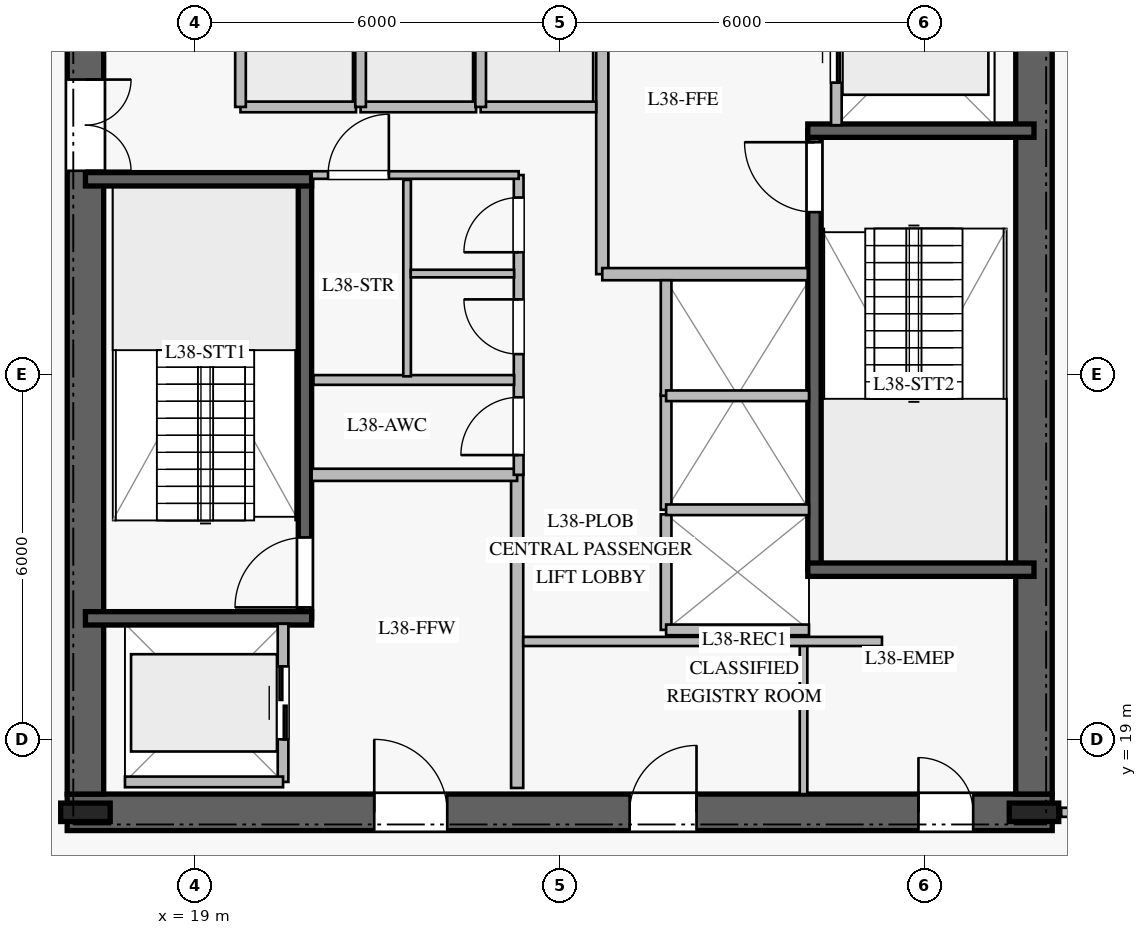
"""IFC4 building model, lengths in metres.
Left out: names, types, materials, properties, quantities, classifications, styles, units other than length and angle.
Written with IfcOpenShell. Run it as: python <this file> out.ifc"""

import sys

from ifc_helpers import new_model, si_unit, direction, frame, frame_2d, origin, origin_2d, place, context, subcontext, project, spatial, rectangle, i_section, extrude, element, fill, save


model = new_model("IFC4")
c1 = context("Model", 3, precision=1e-05, world=origin(), true_north=direction((0.0, 1.0)))
c2 = subcontext(c1, "Body", "Model", "MODEL_VIEW")
j1 = project(units=[si_unit("LENGTHUNIT", "METRE"), si_unit("PLANEANGLEUNIT", "RADIAN")], contexts=[c1])
p1 = place(None, origin())
s1 = spatial("IfcSite", under=j1, at=p1, CompositionType="ELEMENT")
p2 = place(p1, origin())
s2 = spatial("IfcBuilding", under=s1, at=p2, CompositionType="ELEMENT")
p3 = place(p2, frame((0.0, 0.0, 158.4)))
s3 = spatial("IfcBuildingStorey", under=s2, at=p3, CompositionType="ELEMENT", Elevation=158.4)
p4 = place(p3, frame((16.9, 17.8, 0.0), z_axis=(0.0, 0.0, 1.0), x_axis=(1.0, 0.0, 0.0)))
e1 = element("IfcWall", 1, at=p4, inside=s3, PredefinedType="SHEAR", context=c2, shape_type="SweptSolid", body=[
    extrude(rectangle(XDim=16.2, YDim=0.6, at=frame_2d((8.1, 0.0))), origin(), (0.0, 0.0, 1.0), 3.76),
])
p5 = place(p4, frame((5.05, 0.0, 0.0)))
e2 = element("IfcOpeningElement", 2, at=p5, cuts=e1, PredefinedType="OPENING", context=c2, shape_type="SweptSolid", body=[
    extrude(rectangle(XDim=1.2, YDim=2.25, at=frame_2d((0.6, 1.125))), frame((0.0, 0.31, 0.0), z_axis=(0.0, -1.0, 0.0), x_axis=(1.0, 0.0, 0.0)), (0.0, 0.0, 1.0), 0.62),
])
p6 = place(p4, frame((14.0, 0.0, 0.0)))
e3 = element("IfcOpeningElement", 3, at=p6, cuts=e1, PredefinedType="OPENING", context=c2, shape_type="SweptSolid", body=[
    extrude(rectangle(XDim=0.9, YDim=2.1, at=frame_2d((0.45, 1.05))), frame((0.0, 0.31, 0.0), z_axis=(0.0, -1.0, 0.0), x_axis=(1.0, 0.0, 0.0)), (0.0, 0.0, 1.0), 0.62),
])
p7 = place(p4, frame((9.25, 0.0, 0.0)))
e4 = element("IfcOpeningElement", 4, at=p7, cuts=e1, PredefinedType="OPENING", context=c2, shape_type="SweptSolid", body=[
    extrude(rectangle(XDim=1.1, YDim=2.2, at=frame_2d((0.55, 1.1))), frame((0.0, 0.31, 0.0), z_axis=(0.0, -1.0, 0.0), x_axis=(1.0, 0.0, 0.0)), (0.0, 0.0, 1.0), 0.62),
])
p8 = place(p3, frame((17.2, 31.9, 0.0), z_axis=(0.0, 0.0, 1.0), x_axis=(0.0, -1.0, 0.0)))
e5 = element("IfcWall", 5, at=p8, inside=s3, PredefinedType="SHEAR", context=c2, shape_type="SweptSolid", body=[
    extrude(rectangle(XDim=13.8, YDim=0.6, at=frame_2d((6.9, 0.0))), origin(), (0.0, 0.0, 1.0), 3.76),
])
p9 = place(p8, frame((2.05, 0.0, 0.0)))
e6 = element("IfcOpeningElement", 6, at=p9, cuts=e5, PredefinedType="OPENING", context=c2, shape_type="SweptSolid", body=[
    extrude(rectangle(XDim=1.5, YDim=2.2, at=frame_2d((0.75, 1.1))), frame((0.0, 0.31, 0.0), z_axis=(0.0, -1.0, 0.0), x_axis=(1.0, 0.0, 0.0)), (0.0, 0.0, 1.0), 0.62),
])
p10 = place(p3, frame((32.8, 18.1, 0.0), z_axis=(0.0, 0.0, 1.0), x_axis=(0.0, 1.0, 0.0)))
e7 = element("IfcWall", 7, at=p10, inside=s3, PredefinedType="SHEAR", context=c2, shape_type="SweptSolid", body=[
    extrude(rectangle(XDim=13.8, YDim=0.6, at=frame_2d((6.9, 0.0))), origin(), (0.0, 0.0, 1.0), 3.76),
])
for number, where, z_axis, x_axis in (
    (8, (17.2, 17.8, 0.0), (0.0, 0.0, 1.0), (1.0, 0.0, 0.0)),
    (9, (32.8, 17.8, 0.0), (0.0, 0.0, 1.0), (1.0, 0.0, 0.0)),
):
    element("IfcColumn", number, at=place(p3, frame(where, z_axis=z_axis, x_axis=x_axis)), inside=s3, PredefinedType="COLUMN", context=c2, shape_type="SweptSolid", body=[
        extrude(i_section(OverallWidth=0.303, OverallDepth=0.814, WebThickness=0.021, FlangeThickness=0.04, at=origin_2d()), origin(), (0.0, 0.0, 1.0), 4.0),
    ])
p11 = place(p3, frame((20.81, 20.99, 0.0), z_axis=(0.0, 0.0, 1.0), x_axis=(0.0, 1.0, 0.0)))
e10 = element("IfcWall", 10, at=p11, inside=s3, PredefinedType="SOLIDWALL", context=c2, shape_type="SweptSolid", body=[
    extrude(rectangle(XDim=7.22, YDim=0.22, at=frame_2d((3.61, 0.0))), origin(), (0.0, 0.0, 1.0), 3.76),
])
p12 = place(p11, frame((0.18, 0.0, 0.0)))
e11 = element("IfcOpeningElement", 11, at=p12, cuts=e10, PredefinedType="OPENING", context=c2, shape_type="SweptSolid", body=[
    extrude(rectangle(XDim=1.15, YDim=2.2, at=frame_2d((0.575, 1.1))), frame((0.0, 0.12, 0.0), z_axis=(0.0, -1.0, 0.0), x_axis=(1.0, 0.0, 0.0)), (0.0, 0.0, 1.0), 0.24),
])
for number, where, z_axis, x_axis in (
    (12, (17.2, 20.99, 0.0), (0.0, 0.0, 1.0), (1.0, 0.0, 0.0)),
    (13, (17.2, 28.21, 0.0), (0.0, 0.0, 1.0), (1.0, 0.0, 0.0)),
):
    element("IfcWall", number, at=place(p3, frame(where, z_axis=z_axis, x_axis=x_axis)), inside=s3, PredefinedType="SOLIDWALL", context=c2, shape_type="SweptSolid", body=[
        extrude(rectangle(XDim=3.72, YDim=0.22, at=frame_2d((1.86, 0.0))), origin(), (0.0, 0.0, 1.0), 3.76),
    ])
p13 = place(p3, frame((29.19, 21.79, 0.0), z_axis=(0.0, 0.0, 1.0), x_axis=(0.0, 1.0, 0.0)))
e14 = element("IfcWall", 14, at=p13, inside=s3, PredefinedType="SOLIDWALL", context=c2, shape_type="SweptSolid", body=[
    extrude(rectangle(XDim=7.22, YDim=0.22, at=frame_2d((3.61, 0.0))), origin(), (0.0, 0.0, 1.0), 3.76),
])
p14 = place(p13, frame((5.88, 0.0, 0.0)))
e15 = element("IfcOpeningElement", 15, at=p14, cuts=e14, PredefinedType="OPENING", context=c2, shape_type="SweptSolid", body=[
    extrude(rectangle(XDim=1.15, YDim=2.2, at=frame_2d((0.575, 1.1))), frame((0.0, 0.12, 0.0), z_axis=(0.0, -1.0, 0.0), x_axis=(1.0, 0.0, 0.0)), (0.0, 0.0, 1.0), 0.24),
])
for number, where, z_axis, x_axis in (
    (16, (29.08, 21.79, 0.0), (0.0, 0.0, 1.0), (1.0, 0.0, 0.0)),
    (17, (29.08, 29.01, 0.0), (0.0, 0.0, 1.0), (1.0, 0.0, 0.0)),
):
    element("IfcWall", number, at=place(p3, frame(where, z_axis=z_axis, x_axis=x_axis)), inside=s3, PredefinedType="SOLIDWALL", context=c2, shape_type="SweptSolid", body=[
        extrude(rectangle(XDim=3.72, YDim=0.22, at=frame_2d((1.86, 0.0))), origin(), (0.0, 0.0, 1.0), 3.76),
    ])
p15 = place(p3, frame((24.3, 18.2, 0.0), z_axis=(0.0, 0.0, 1.0), x_axis=(0.0, 1.0, 0.0)))
e18 = element("IfcWall", 18, at=p15, inside=s3, PredefinedType="PARTITIONING", context=c2, shape_type="SweptSolid", body=[
    extrude(rectangle(XDim=5.15, YDim=0.2, at=frame_2d((2.575, 0.0))), origin(), (0.0, 0.0, 1.0), 3.76),
])
p16 = place(p3, frame((20.92, 23.35, 0.0), z_axis=(0.0, 0.0, 1.0), x_axis=(1.0, 0.0, 0.0)))
e19 = element("IfcWall", 19, at=p16, inside=s3, PredefinedType="PARTITIONING", context=c2, shape_type="SweptSolid", body=[
    extrude(rectangle(XDim=3.38, YDim=0.2, at=frame_2d((1.69, 0.0))), origin(), (0.0, 0.0, 1.0), 3.76),
])
p17 = place(p3, frame((25.7, 26.65, 0.0), z_axis=(0.0, 0.0, 1.0), x_axis=(0.0, 1.0, 0.0)))
e20 = element("IfcWall", 20, at=p17, inside=s3, PredefinedType="PARTITIONING", context=c2, shape_type="SweptSolid", body=[
    extrude(rectangle(XDim=5.15, YDim=0.2, at=frame_2d((2.575, 0.0))), origin(), (0.0, 0.0, 1.0), 3.76),
])
p18 = place(p3, frame((25.7, 26.65, 0.0), z_axis=(0.0, 0.0, 1.0), x_axis=(1.0, 0.0, 0.0)))
e21 = element("IfcWall", 21, at=p18, inside=s3, PredefinedType="PARTITIONING", context=c2, shape_type="SweptSolid", body=[
    extrude(rectangle(XDim=3.38, YDim=0.2, at=frame_2d((1.69, 0.0))), origin(), (0.0, 0.0, 1.0), 3.76),
])
p19 = place(p3, frame((24.325, 23.35, 0.0), z_axis=(0.0, 0.0, 1.0), x_axis=(0.0, 1.0, 0.0)))
e22 = element("IfcWall", 22, at=p19, inside=s3, PredefinedType="PLUMBINGWALL", context=c2, shape_type="SweptSolid", body=[
    extrude(rectangle(XDim=4.93, YDim=0.16, at=frame_2d((2.465, 0.0))), origin(), (0.0, 0.0, 1.0), 3.76),
])
p20 = place(p19, frame((0.325, 0.0, 0.0)))
e23 = element("IfcOpeningElement", 23, at=p20, cuts=e22, PredefinedType="OPENING", context=c2, shape_type="SweptSolid", body=[
    extrude(rectangle(XDim=0.95, YDim=2.1, at=frame_2d((0.475, 1.05))), frame((0.0, 0.09, 0.0), z_axis=(0.0, -1.0, 0.0), x_axis=(1.0, 0.0, 0.0)), (0.0, 0.0, 1.0), 0.18),
])
p21 = place(p19, frame((1.985, 0.0, 0.0)))
e24 = element("IfcOpeningElement", 24, at=p21, cuts=e22, PredefinedType="OPENING", context=c2, shape_type="SweptSolid", body=[
    extrude(rectangle(XDim=0.9, YDim=2.1, at=frame_2d((0.45, 1.05))), frame((0.0, 0.09, 0.0), z_axis=(0.0, -1.0, 0.0), x_axis=(1.0, 0.0, 0.0)), (0.0, 0.0, 1.0), 0.18),
])
p22 = place(p19, frame((3.66, 0.0, 0.0)))
e25 = element("IfcOpeningElement", 25, at=p22, cuts=e22, PredefinedType="OPENING", context=c2, shape_type="SweptSolid", body=[
    extrude(rectangle(XDim=0.9, YDim=2.1, at=frame_2d((0.45, 1.05))), frame((0.0, 0.09, 0.0), z_axis=(0.0, -1.0, 0.0), x_axis=(1.0, 0.0, 0.0)), (0.0, 0.0, 1.0), 0.18),
])
p23 = place(p3, frame((20.92, 28.28, 0.0), z_axis=(0.0, 0.0, 1.0), x_axis=(1.0, 0.0, 0.0)))
e26 = element("IfcWall", 26, at=p23, inside=s3, PredefinedType="PARTITIONING", context=c2, shape_type="SweptSolid", body=[
    extrude(rectangle(XDim=3.405, YDim=0.125, at=frame_2d((1.703, 0.0))), origin(), (0.0, 0.0, 1.0), 3.76),
])
p24 = place(p23, frame((0.27, 0.0, 0.0)))
e27 = element("IfcOpeningElement", 27, at=p24, cuts=e26, PredefinedType="OPENING", context=c2, shape_type="SweptSolid", body=[
    extrude(rectangle(XDim=1.0, YDim=2.15, at=frame_2d((0.5, 1.075))), frame((0.0, 0.073, 0.0), z_axis=(0.0, -1.0, 0.0), x_axis=(1.0, 0.0, 0.0)), (0.0, 0.0, 1.0), 0.145),
])
p25 = place(p3, frame((29.01, 18.1, 0.0), z_axis=(0.0, 0.0, 1.0), x_axis=(0.0, 1.0, 0.0)))
e28 = element("IfcWall", 28, at=p25, inside=s3, PredefinedType="PARTITIONING", context=c2, shape_type="SweptSolid", body=[
    extrude(rectangle(XDim=2.45, YDim=0.125, at=frame_2d((1.225, 0.0))), origin(), (0.0, 0.0, 1.0), 3.06),
])
p26 = place(p3, frame((20.95, 24.91, 0.0), z_axis=(0.0, 0.0, 1.0), x_axis=(1.0, 0.0, 0.0)))
e29 = element("IfcWall", 29, at=p26, inside=s3, PredefinedType="PLUMBINGWALL", context=c2, shape_type="SweptSolid", body=[
    extrude(rectangle(XDim=3.3, YDim=0.16, at=frame_2d((1.65, 0.0))), origin(), (0.0, 0.0, 1.0), 3.76),
])
p27 = place(p3, frame((22.49, 24.97, 0.0), z_axis=(0.0, 0.0, 1.0), x_axis=(0.0, 1.0, 0.0)))
e30 = element("IfcWall", 30, at=p27, inside=s3, PredefinedType="PARTITIONING", context=c2, shape_type="SweptSolid", body=[
    extrude(rectangle(XDim=3.23, YDim=0.125, at=frame_2d((1.615, 0.0))), origin(), (0.0, 0.0, 1.0), 3.76),
])
p28 = place(p3, frame((22.55, 26.66, 0.0), z_axis=(0.0, 0.0, 1.0), x_axis=(1.0, 0.0, 0.0)))
e31 = element("IfcWall", 31, at=p28, inside=s3, PredefinedType="PARTITIONING", context=c2, shape_type="SweptSolid", body=[
    extrude(rectangle(XDim=1.7, YDim=0.125, at=frame_2d((0.85, 0.0))), origin(), (0.0, 0.0, 1.0), 3.76),
])
p29 = place(p3, frame((24.4, 20.61, 0.0), z_axis=(0.0, 0.0, 1.0), x_axis=(1.0, 0.0, 0.0)))
e32 = element("IfcWall", 32, at=p29, inside=s3, PredefinedType="PARTITIONING", context=c2, shape_type="SweptSolid", body=[
    extrude(rectangle(XDim=5.9, YDim=0.15, at=frame_2d((2.95, 0.0))), origin(), (0.0, 0.0, 1.0), 3.76),
])
p30 = place(p3, frame((19.75, 29.4, 0.0), z_axis=(0.0, 0.0, 1.0), x_axis=(1.0, 0.0, 0.0)))
e33 = element("IfcWall", 33, at=p30, inside=s3, PredefinedType="PARTITIONING", context=c2, shape_type="SweptSolid", body=[
    extrude(rectangle(XDim=1.9, YDim=0.175, at=frame_2d((0.95, 0.0))), origin(), (0.0, 0.0, 1.0), 3.76),
])
p31 = place(p3, frame((19.75, 29.4, 0.0), z_axis=(0.0, 0.0, 1.0), x_axis=(0.0, 1.0, 0.0)))
e34 = element("IfcWall", 34, at=p31, inside=s3, PredefinedType="PARTITIONING", context=c2, shape_type="SweptSolid", body=[
    extrude(rectangle(XDim=2.35, YDim=0.175, at=frame_2d((1.175, 0.0))), origin(), (0.0, 0.0, 1.0), 3.76),
])
p32 = place(p3, frame((21.725, 29.4, 0.0), z_axis=(0.0, 0.0, 1.0), x_axis=(1.0, 0.0, 0.0)))
e35 = element("IfcWall", 35, at=p32, inside=s3, PredefinedType="PARTITIONING", context=c2, shape_type="SweptSolid", body=[
    extrude(rectangle(XDim=1.9, YDim=0.175, at=frame_2d((0.95, 0.0))), origin(), (0.0, 0.0, 1.0), 3.76),
])
p33 = place(p3, frame((21.725, 29.4, 0.0), z_axis=(0.0, 0.0, 1.0), x_axis=(0.0, 1.0, 0.0)))
e36 = element("IfcWall", 36, at=p33, inside=s3, PredefinedType="PARTITIONING", context=c2, shape_type="SweptSolid", body=[
    extrude(rectangle(XDim=2.35, YDim=0.175, at=frame_2d((1.175, 0.0))), origin(), (0.0, 0.0, 1.0), 3.76),
])
p34 = place(p3, frame((23.7, 29.4, 0.0), z_axis=(0.0, 0.0, 1.0), x_axis=(1.0, 0.0, 0.0)))
e37 = element("IfcWall", 37, at=p34, inside=s3, PredefinedType="PARTITIONING", context=c2, shape_type="SweptSolid", body=[
    extrude(rectangle(XDim=1.9, YDim=0.175, at=frame_2d((0.95, 0.0))), origin(), (0.0, 0.0, 1.0), 3.76),
])
p35 = place(p3, frame((23.7, 29.4, 0.0), z_axis=(0.0, 0.0, 1.0), x_axis=(0.0, 1.0, 0.0)))
e38 = element("IfcWall", 38, at=p35, inside=s3, PredefinedType="PARTITIONING", context=c2, shape_type="SweptSolid", body=[
    extrude(rectangle(XDim=2.35, YDim=0.175, at=frame_2d((1.175, 0.0))), origin(), (0.0, 0.0, 1.0), 3.76),
])
p36 = place(p3, frame((26.75, 20.8, 0.0), z_axis=(0.0, 0.0, 1.0), x_axis=(0.0, 1.0, 0.0)))
e39 = element("IfcWall", 39, at=p36, inside=s3, PredefinedType="PARTITIONING", context=c2, shape_type="SweptSolid", body=[
    extrude(rectangle(XDim=1.9, YDim=0.175, at=frame_2d((0.95, 0.0))), origin(), (0.0, 0.0, 1.0), 3.76),
])
p37 = place(p3, frame((26.75, 20.8, 0.0), z_axis=(0.0, 0.0, 1.0), x_axis=(1.0, 0.0, 0.0)))
e40 = element("IfcWall", 40, at=p37, inside=s3, PredefinedType="PARTITIONING", context=c2, shape_type="SweptSolid", body=[
    extrude(rectangle(XDim=2.35, YDim=0.175, at=frame_2d((1.175, 0.0))), origin(), (0.0, 0.0, 1.0), 3.76),
])
p38 = place(p3, frame((26.75, 22.775, 0.0), z_axis=(0.0, 0.0, 1.0), x_axis=(0.0, 1.0, 0.0)))
e41 = element("IfcWall", 41, at=p38, inside=s3, PredefinedType="PARTITIONING", context=c2, shape_type="SweptSolid", body=[
    extrude(rectangle(XDim=1.9, YDim=0.175, at=frame_2d((0.95, 0.0))), origin(), (0.0, 0.0, 1.0), 3.76),
])
p39 = place(p3, frame((26.75, 22.775, 0.0), z_axis=(0.0, 0.0, 1.0), x_axis=(1.0, 0.0, 0.0)))
e42 = element("IfcWall", 42, at=p39, inside=s3, PredefinedType="PARTITIONING", context=c2, shape_type="SweptSolid", body=[
    extrude(rectangle(XDim=2.35, YDim=0.175, at=frame_2d((1.175, 0.0))), origin(), (0.0, 0.0, 1.0), 3.76),
])
p40 = place(p3, frame((26.75, 24.65, 0.0), z_axis=(0.0, 0.0, 1.0), x_axis=(0.0, 1.0, 0.0)))
e43 = element("IfcWall", 43, at=p40, inside=s3, PredefinedType="PARTITIONING", context=c2, shape_type="SweptSolid", body=[
    extrude(rectangle(XDim=1.9, YDim=0.175, at=frame_2d((0.95, 0.0))), origin(), (0.0, 0.0, 1.0), 3.76),
])
p41 = place(p3, frame((26.75, 24.65, 0.0), z_axis=(0.0, 0.0, 1.0), x_axis=(1.0, 0.0, 0.0)))
e44 = element("IfcWall", 44, at=p41, inside=s3, PredefinedType="PARTITIONING", context=c2, shape_type="SweptSolid", body=[
    extrude(rectangle(XDim=2.35, YDim=0.175, at=frame_2d((1.175, 0.0))), origin(), (0.0, 0.0, 1.0), 3.76),
])
p42 = place(p3, frame((20.45, 18.3, 0.0), z_axis=(0.0, 0.0, 1.0), x_axis=(0.0, 1.0, 0.0)))
e45 = element("IfcWall", 45, at=p42, inside=s3, PredefinedType="PARTITIONING", context=c2, shape_type="SweptSolid", body=[
    extrude(rectangle(XDim=2.6, YDim=0.175, at=frame_2d((1.3, 0.0))), origin(), (0.0, 0.0, 1.0), 3.76),
])
p43 = place(p42, frame((0.7, 0.0, 0.0)))
e46 = element("IfcOpeningElement", 46, at=p43, cuts=e45, PredefinedType="OPENING", context=c2, shape_type="SweptSolid", body=[
    extrude(rectangle(XDim=1.2, YDim=2.2, at=frame_2d((0.6, 1.1))), frame((0.0, 0.098, 0.0), z_axis=(0.0, -1.0, 0.0), x_axis=(1.0, 0.0, 0.0)), (0.0, 0.0, 1.0), 0.195),
])
p44 = place(p3, frame((17.85, 18.3, 0.0), z_axis=(0.0, 0.0, 1.0), x_axis=(1.0, 0.0, 0.0)))
e47 = element("IfcWall", 47, at=p44, inside=s3, PredefinedType="PARTITIONING", context=c2, shape_type="SweptSolid", body=[
    extrude(rectangle(XDim=2.6, YDim=0.175, at=frame_2d((1.3, 0.0))), origin(), (0.0, 0.0, 1.0), 3.76),
])
p45 = place(p3, frame((29.55, 29.1, 0.0), z_axis=(0.0, 0.0, 1.0), x_axis=(0.0, 1.0, 0.0)))
e48 = element("IfcWall", 48, at=p45, inside=s3, PredefinedType="PARTITIONING", context=c2, shape_type="SweptSolid", body=[
    extrude(rectangle(XDim=2.6, YDim=0.175, at=frame_2d((1.3, 0.0))), origin(), (0.0, 0.0, 1.0), 3.76),
])
p46 = place(p45, frame((0.7, 0.0, 0.0)))
e49 = element("IfcOpeningElement", 49, at=p46, cuts=e48, PredefinedType="OPENING", context=c2, shape_type="SweptSolid", body=[
    extrude(rectangle(XDim=1.2, YDim=2.2, at=frame_2d((0.6, 1.1))), frame((0.0, 0.098, 0.0), z_axis=(0.0, -1.0, 0.0), x_axis=(1.0, 0.0, 0.0)), (0.0, 0.0, 1.0), 0.195),
])
p47 = place(p3, frame((33.247, 17.8, 0.0), z_axis=(0.0, 0.0, 1.0), x_axis=(1.0, 0.0, 0.0)))
e50 = element("IfcWall", 50, at=p47, inside=s3, PredefinedType="PARTITIONING", context=c2, shape_type="SweptSolid", body=[
    extrude(rectangle(XDim=7.953, YDim=0.15, at=frame_2d((3.977, 0.0))), origin(), (0.0, 0.0, 1.0), 3.05),
])
p48 = place(p12, origin())
e51 = element("IfcDoor", 51, at=p48, inside=s3, OperationType="SINGLE_SWING_LEFT", PredefinedType="DOOR", context=c2, shape_type="SweptSolid", body=[
    extrude(rectangle(XDim=1.15, YDim=2.2, at=frame_2d((0.575, 1.1))), frame((0.0, 0.025, 0.0), z_axis=(0.0, -1.0, 0.0), x_axis=(1.0, 0.0, 0.0)), (0.0, 0.0, 1.0), 0.05),
])
fill(e11, e51)
p49 = place(p14, origin())
e52 = element("IfcDoor", 52, at=p49, inside=s3, OperationType="SINGLE_SWING_RIGHT", PredefinedType="DOOR", context=c2, shape_type="SweptSolid", body=[
    extrude(rectangle(XDim=1.15, YDim=2.2, at=frame_2d((0.575, 1.1))), frame((0.0, 0.025, 0.0), z_axis=(0.0, -1.0, 0.0), x_axis=(1.0, 0.0, 0.0)), (0.0, 0.0, 1.0), 0.05),
])
fill(e15, e52)
p50 = place(p5, origin())
e53 = element("IfcDoor", 53, at=p50, inside=s3, OperationType="SINGLE_SWING_LEFT", PredefinedType="DOOR", context=c2, shape_type="SweptSolid", body=[
    extrude(rectangle(XDim=1.2, YDim=2.25, at=frame_2d((0.6, 1.125))), frame((0.0, 0.025, 0.0), z_axis=(0.0, -1.0, 0.0), x_axis=(1.0, 0.0, 0.0)), (0.0, 0.0, 1.0), 0.05),
])
fill(e2, e53)
p51 = place(p9, origin())
e54 = element("IfcDoor", 54, at=p51, inside=s3, OperationType="DOUBLE_DOOR_SINGLE_SWING", PredefinedType="DOOR", context=c2, shape_type="SweptSolid", body=[
    extrude(rectangle(XDim=1.5, YDim=2.2, at=frame_2d((0.75, 1.1))), frame((0.0, 0.025, 0.0), z_axis=(0.0, -1.0, 0.0), x_axis=(1.0, 0.0, 0.0)), (0.0, 0.0, 1.0), 0.05),
])
fill(e6, e54)
p52 = place(p20, origin())
e55 = element("IfcDoor", 55, at=p52, inside=s3, OperationType="SINGLE_SWING_LEFT", PredefinedType="DOOR", context=c2, shape_type="SweptSolid", body=[
    extrude(rectangle(XDim=0.95, YDim=2.1, at=frame_2d((0.475, 1.05))), frame((0.0, 0.025, 0.0), z_axis=(0.0, -1.0, 0.0), x_axis=(1.0, 0.0, 0.0)), (0.0, 0.0, 1.0), 0.05),
])
fill(e23, e55)
p53 = place(p21, origin())
e56 = element("IfcDoor", 56, at=p53, inside=s3, OperationType="SINGLE_SWING_RIGHT", PredefinedType="DOOR", context=c2, shape_type="SweptSolid", body=[
    extrude(rectangle(XDim=0.9, YDim=2.1, at=frame_2d((0.45, 1.05))), frame((0.0, 0.025, 0.0), z_axis=(0.0, -1.0, 0.0), x_axis=(1.0, 0.0, 0.0)), (0.0, 0.0, 1.0), 0.05),
])
fill(e24, e56)
p54 = place(p22, origin())
e57 = element("IfcDoor", 57, at=p54, inside=s3, OperationType="SINGLE_SWING_LEFT", PredefinedType="DOOR", context=c2, shape_type="SweptSolid", body=[
    extrude(rectangle(XDim=0.9, YDim=2.1, at=frame_2d((0.45, 1.05))), frame((0.0, 0.025, 0.0), z_axis=(0.0, -1.0, 0.0), x_axis=(1.0, 0.0, 0.0)), (0.0, 0.0, 1.0), 0.05),
])
fill(e25, e57)
p55 = place(p24, origin())
e58 = element("IfcDoor", 58, at=p55, inside=s3, OperationType="SINGLE_SWING_RIGHT", PredefinedType="DOOR", context=c2, shape_type="SweptSolid", body=[
    extrude(rectangle(XDim=1.0, YDim=2.15, at=frame_2d((0.5, 1.075))), frame((0.0, 0.025, 0.0), z_axis=(0.0, -1.0, 0.0), x_axis=(1.0, 0.0, 0.0)), (0.0, 0.0, 1.0), 0.05),
])
fill(e27, e58)
p56 = place(p6, origin())
e59 = element("IfcDoor", 59, at=p56, inside=s3, OperationType="SINGLE_SWING_LEFT", PredefinedType="DOOR", context=c2, shape_type="SweptSolid", body=[
    extrude(rectangle(XDim=0.9, YDim=2.1, at=frame_2d((0.45, 1.05))), frame((0.0, 0.025, 0.0), z_axis=(0.0, -1.0, 0.0), x_axis=(1.0, 0.0, 0.0)), (0.0, 0.0, 1.0), 0.05),
])
fill(e3, e59)
p57 = place(p7, origin())
e60 = element("IfcDoor", 60, at=p57, inside=s3, OperationType="SINGLE_SWING_RIGHT", PredefinedType="DOOR", context=c2, shape_type="SweptSolid", body=[
    extrude(rectangle(XDim=1.1, YDim=2.2, at=frame_2d((0.55, 1.1))), frame((0.0, 0.025, 0.0), z_axis=(0.0, -1.0, 0.0), x_axis=(1.0, 0.0, 0.0)), (0.0, 0.0, 1.0), 0.05),
])
fill(e4, e60)
p58 = place(p43, origin())
e61 = element("IfcDoor", 61, at=p58, inside=s3, OperationType="DOUBLE_DOOR_SLIDING", PredefinedType="DOOR", context=c2, shape_type="SweptSolid", body=[
    extrude(rectangle(XDim=1.2, YDim=2.2, at=frame_2d((0.6, 1.1))), frame((0.0, 0.025, 0.0), z_axis=(0.0, -1.0, 0.0), x_axis=(1.0, 0.0, 0.0)), (0.0, 0.0, 1.0), 0.05),
])
fill(e46, e61)
p59 = place(p46, origin())
e62 = element("IfcDoor", 62, at=p59, inside=s3, OperationType="DOUBLE_DOOR_SLIDING", PredefinedType="DOOR", context=c2, shape_type="SweptSolid", body=[
    extrude(rectangle(XDim=1.2, YDim=2.2, at=frame_2d((0.6, 1.1))), frame((0.0, 0.025, 0.0), z_axis=(0.0, -1.0, 0.0), x_axis=(1.0, 0.0, 0.0)), (0.0, 0.0, 1.0), 0.05),
])
fill(e49, e62)
save(model, sys.argv[1])
